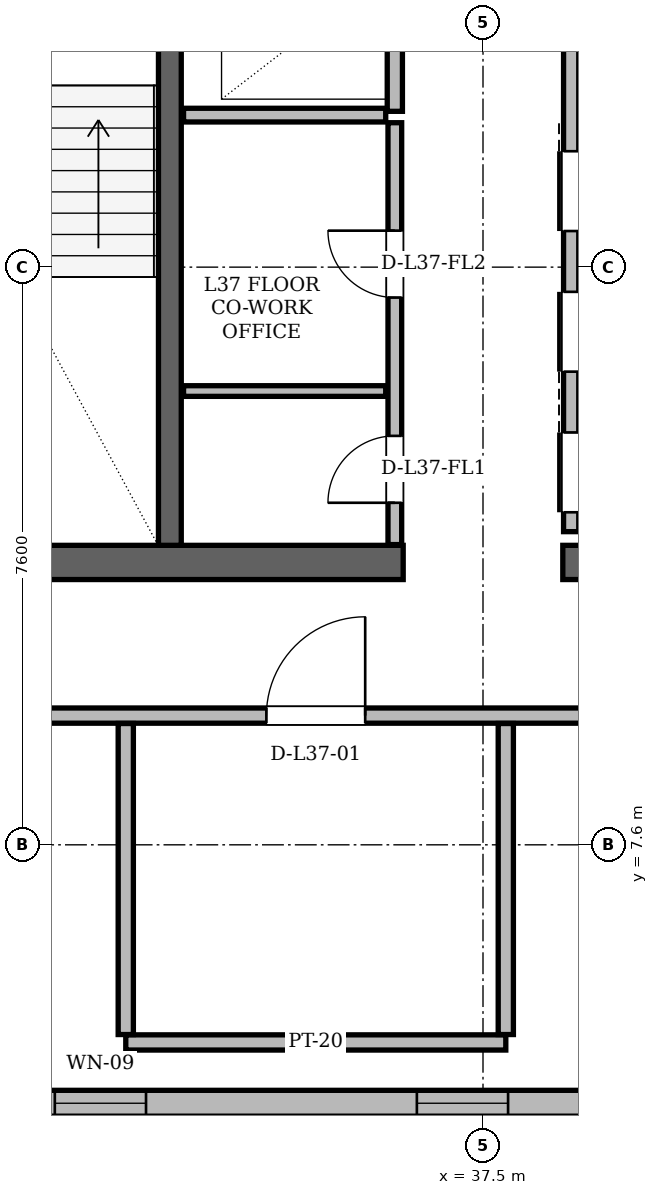
"""IFC4 building model, lengths in metres.
Left out: names, types, materials, properties, quantities, classifications, styles, units other than length and angle.
Written with IfcOpenShell. Run it as: python <this file> out.ifc"""

import sys

from ifc_helpers import new_model, si_unit, direction, frame, frame_2d, origin, place, context, subcontext, project, spatial, rectangle, extrude, element, fill, save


model = new_model("IFC4")
c1 = context("Model", 3, precision=1e-05, world=origin(), true_north=direction((0.0, 1.0)))
c2 = subcontext(c1, "Body", "Model", "MODEL_VIEW")
j1 = project(units=[si_unit("LENGTHUNIT", "METRE"), si_unit("PLANEANGLEUNIT", "RADIAN")], contexts=[c1])
p1 = place(None, origin())
s1 = spatial("IfcSite", under=j1, at=p1, CompositionType="ELEMENT")
p2 = place(p1, origin())
s2 = spatial("IfcBuilding", under=s1, at=p2, CompositionType="ELEMENT")
p3 = place(p2, frame((0.0, 0.0, 142.2)))
s3 = spatial("IfcBuildingStorey", under=s2, at=p3, CompositionType="ELEMENT", Elevation=142.2)
for number, where, z_axis, x_axis in (
    (1, (29.35, 11.315, 0.0), (0.0, 0.0, 1.0), (1.0, 0.0, 0.0)),
    (2, (38.55, 11.315, 0.0), (0.0, 0.0, 1.0), (1.0, 0.0, 0.0)),
):
    element("IfcWall", number, at=place(p3, frame(where, z_axis=z_axis, x_axis=x_axis)), inside=s3, PredefinedType="SHEAR", context=c2, shape_type="SweptSolid", body=[
        extrude(rectangle(XDim=7.1, YDim=0.45, at=frame_2d((3.55, 0.0))), origin(), (0.0, 0.0, 1.0), 3.36),
    ])
p4 = place(p3, frame((33.38, 11.54, 0.0), z_axis=(0.0, 0.0, 1.0), x_axis=(0.0, 1.0, 0.0)))
e3 = element("IfcWall", 3, at=p4, inside=s3, PredefinedType="SHEAR", context=c2, shape_type="SweptSolid", body=[
    extrude(rectangle(XDim=7.62, YDim=0.3, at=frame_2d((3.81, 0.0))), origin(), (0.0, 0.0, 1.0), 3.36),
])
p5 = place(p3, frame((19.833, 4.2, 0.0), z_axis=(0.0, 0.0, 1.0), x_axis=(1.0, 0.0, 0.0)))
e4 = element("IfcWall", 4, at=p5, inside=s3, PredefinedType="SOLIDWALL", context=c2, shape_type="SweptSolid", body=[
    extrude(rectangle(XDim=35.334, YDim=0.34, at=frame_2d((17.667, 0.0))), origin(), (0.0, 0.0, 1.0), 2.58),
])
p6 = place(p5, frame((8.034, 0.0, 0.0)))
e5 = element("IfcOpeningElement", 5, at=p6, cuts=e4, PredefinedType="OPENING", context=c2, shape_type="SweptSolid", body=[
    extrude(rectangle(XDim=1.5, YDim=2.2, at=frame_2d((0.75, 1.1))), frame((0.0, 0.17, 0.0), z_axis=(0.0, -1.0, 0.0), x_axis=(1.0, 0.0, 0.0)), (0.0, 0.0, 1.0), 0.34),
])
p7 = place(p5, frame((27.465, 0.0, 0.0)))
e6 = element("IfcOpeningElement", 6, at=p7, cuts=e4, PredefinedType="OPENING", context=c2, shape_type="SweptSolid", body=[
    extrude(rectangle(XDim=1.5, YDim=2.2, at=frame_2d((0.75, 1.1))), frame((0.0, 0.17, 0.0), z_axis=(0.0, -1.0, 0.0), x_axis=(1.0, 0.0, 0.0)), (0.0, 0.0, 1.0), 0.34),
])
p8 = place(p5, frame((12.033, 0.0, 0.85)))
e7 = element("IfcOpeningElement", 7, at=p8, cuts=e4, PredefinedType="OPENING", context=c2, shape_type="SweptSolid", body=[
    extrude(rectangle(XDim=1.2, YDim=1.48, at=frame_2d((0.6, 0.74))), frame((0.0, 0.17, 0.0), z_axis=(0.0, -1.0, 0.0), x_axis=(1.0, 0.0, 0.0)), (0.0, 0.0, 1.0), 0.34),
])
p9 = place(p5, frame((16.797, 0.0, 0.85)))
e8 = element("IfcOpeningElement", 8, at=p9, cuts=e4, PredefinedType="OPENING", context=c2, shape_type="SweptSolid", body=[
    extrude(rectangle(XDim=1.2, YDim=1.48, at=frame_2d((0.6, 0.74))), frame((0.0, 0.17, 0.0), z_axis=(0.0, -1.0, 0.0), x_axis=(1.0, 0.0, 0.0)), (0.0, 0.0, 1.0), 0.34),
])
p10 = place(p5, frame((31.313, 0.0, 0.85)))
e9 = element("IfcOpeningElement", 9, at=p10, cuts=e4, PredefinedType="OPENING", context=c2, shape_type="SweptSolid", body=[
    extrude(rectangle(XDim=2.6, YDim=1.62, at=frame_2d((1.3, 0.81))), frame((0.0, 0.17, 0.0), z_axis=(0.0, -1.0, 0.0), x_axis=(1.0, 0.0, 0.0)), (0.0, 0.0, 1.0), 0.34),
])
p11 = place(p5, frame((22.491, 0.0, 0.85)))
e10 = element("IfcOpeningElement", 10, at=p11, cuts=e4, PredefinedType="OPENING", context=c2, shape_type="SweptSolid", body=[
    extrude(rectangle(XDim=1.2, YDim=1.48, at=frame_2d((0.6, 0.74))), frame((0.0, 0.17, 0.0), z_axis=(0.0, -1.0, 0.0), x_axis=(1.0, 0.0, 0.0)), (0.0, 0.0, 1.0), 0.34),
])
p12 = place(p3, frame((32.564, 43.35, 0.0), z_axis=(0.0, 0.0, 1.0), x_axis=(-0.500002563111, -0.866023923966, 0.0)))
e11 = element("IfcWall", 11, at=p12, inside=s3, PredefinedType="SOLIDWALL", context=c2, shape_type="SweptSolid", body=[
    extrude(rectangle(XDim=35.334, YDim=0.34, at=frame_2d((17.667, 0.0))), origin(), (0.0, 0.0, 1.0), 2.58),
])
p13 = place(p12, frame((8.034, 0.0, 0.0)))
e12 = element("IfcOpeningElement", 12, at=p13, cuts=e11, PredefinedType="OPENING", context=c2, shape_type="SweptSolid", body=[
    extrude(rectangle(XDim=1.5, YDim=2.2, at=frame_2d((0.75, 1.1))), frame((0.0, 0.17, 0.0), z_axis=(0.0, -1.0, 0.0), x_axis=(1.0, 0.0, 0.0)), (0.0, 0.0, 1.0), 0.34),
])
p14 = place(p12, frame((26.835, 0.0, 0.0)))
e13 = element("IfcOpeningElement", 13, at=p14, cuts=e11, PredefinedType="OPENING", context=c2, shape_type="SweptSolid", body=[
    extrude(rectangle(XDim=1.5, YDim=2.2, at=frame_2d((0.75, 1.1))), frame((0.0, 0.17, 0.0), z_axis=(0.0, -1.0, 0.0), x_axis=(1.0, 0.0, 0.0)), (0.0, 0.0, 1.0), 0.34),
])
p15 = place(p12, frame((22.185, 0.0, 0.85)))
e14 = element("IfcOpeningElement", 14, at=p15, cuts=e11, PredefinedType="OPENING", context=c2, shape_type="SweptSolid", body=[
    extrude(rectangle(XDim=1.2, YDim=1.48, at=frame_2d((0.6, 0.74))), frame((0.0, 0.17, 0.0), z_axis=(0.0, -1.0, 0.0), x_axis=(1.0, 0.0, 0.0)), (0.0, 0.0, 1.0), 0.34),
])
p16 = place(p12, frame((2.318, 0.0, 0.85)))
e15 = element("IfcOpeningElement", 15, at=p16, cuts=e11, PredefinedType="OPENING", context=c2, shape_type="SweptSolid", body=[
    extrude(rectangle(XDim=1.6, YDim=1.62, at=frame_2d((0.8, 0.81))), frame((0.0, 0.17, 0.0), z_axis=(0.0, -1.0, 0.0), x_axis=(1.0, 0.0, 0.0)), (0.0, 0.0, 1.0), 0.34),
])
p17 = place(p12, frame((12.959, 0.0, 0.85)))
e16 = element("IfcOpeningElement", 16, at=p17, cuts=e11, PredefinedType="OPENING", context=c2, shape_type="SweptSolid", body=[
    extrude(rectangle(XDim=3.0, YDim=1.62, at=frame_2d((1.5, 0.81))), frame((0.0, 0.17, 0.0), z_axis=(0.0, -1.0, 0.0), x_axis=(1.0, 0.0, 0.0)), (0.0, 0.0, 1.0), 0.34),
])
p18 = place(p12, frame((20.293, 0.0, 0.85)))
e17 = element("IfcOpeningElement", 17, at=p18, cuts=e11, PredefinedType="OPENING", context=c2, shape_type="SweptSolid", body=[
    extrude(rectangle(XDim=1.2, YDim=1.48, at=frame_2d((0.6, 0.74))), frame((0.0, 0.17, 0.0), z_axis=(0.0, -1.0, 0.0), x_axis=(1.0, 0.0, 0.0)), (0.0, 0.0, 1.0), 0.34),
])
p19 = place(p12, frame((33.535, 0.0, 0.85)))
e18 = element("IfcOpeningElement", 18, at=p19, cuts=e11, PredefinedType="OPENING", context=c2, shape_type="SweptSolid", body=[
    extrude(rectangle(XDim=1.2, YDim=1.48, at=frame_2d((0.6, 0.74))), frame((0.0, 0.17, 0.0), z_axis=(0.0, -1.0, 0.0), x_axis=(1.0, 0.0, 0.0)), (0.0, 0.0, 1.0), 0.34),
])
p20 = place(p3, frame((36.34, 17.25, 0.0), z_axis=(0.0, 0.0, 1.0), x_axis=(0.0, 1.0, 0.0)))
e19 = element("IfcWall", 19, at=p20, inside=s3, PredefinedType="PARTITIONING", context=c2, shape_type="SweptSolid", body=[
    extrude(rectangle(XDim=2.07, YDim=0.2, at=frame_2d((1.035, 0.0))), origin(), (0.0, 0.0, 1.0), 3.36),
])
p21 = place(p3, frame((33.56, 17.2, 0.0), z_axis=(0.0, 0.0, 1.0), x_axis=(1.0, 0.0, 0.0)))
e20 = element("IfcWall", 20, at=p21, inside=s3, PredefinedType="PARTITIONING", context=c2, shape_type="SweptSolid", body=[
    extrude(rectangle(XDim=2.66, YDim=0.18, at=frame_2d((1.33, 0.0))), origin(), (0.0, 0.0, 1.0), 3.36),
])
p22 = place(p3, frame((36.34, 11.55, 0.0), z_axis=(0.0, 0.0, 1.0), x_axis=(0.0, 1.0, 0.0)))
e21 = element("IfcWall", 21, at=p22, inside=s3, PredefinedType="PARTITIONING", context=c2, shape_type="SweptSolid", body=[
    extrude(rectangle(XDim=5.55, YDim=0.18, at=frame_2d((2.775, 0.0))), origin(), (0.0, 0.0, 1.0), 3.36),
])
p23 = place(p22, frame((0.55, 0.0, 0.0)))
e22 = element("IfcOpeningElement", 22, at=p23, cuts=e21, PredefinedType="OPENING", context=c2, shape_type="SweptSolid", body=[
    extrude(rectangle(XDim=0.88, YDim=2.08, at=frame_2d((0.44, 1.04))), frame((0.0, 0.09, 0.0), z_axis=(0.0, -1.0, 0.0), x_axis=(1.0, 0.0, 0.0)), (0.0, 0.0, 1.0), 0.18),
])
p24 = place(p22, frame((3.25, 0.0, 0.0)))
e23 = element("IfcOpeningElement", 23, at=p24, cuts=e21, PredefinedType="OPENING", context=c2, shape_type="SweptSolid", body=[
    extrude(rectangle(XDim=0.88, YDim=2.08, at=frame_2d((0.44, 1.04))), frame((0.0, 0.09, 0.0), z_axis=(0.0, -1.0, 0.0), x_axis=(1.0, 0.0, 0.0)), (0.0, 0.0, 1.0), 0.18),
])
p25 = place(p3, frame((33.56, 13.57, 0.0), z_axis=(0.0, 0.0, 1.0), x_axis=(1.0, 0.0, 0.0)))
e24 = element("IfcWall", 24, at=p25, inside=s3, PredefinedType="PARTITIONING", context=c2, shape_type="SweptSolid", body=[
    extrude(rectangle(XDim=2.66, YDim=0.14, at=frame_2d((1.33, 0.0))), origin(), (0.0, 0.0, 1.0), 3.36),
])
p26 = place(p3, frame((38.66, 11.72, 0.0), z_axis=(0.0, 0.0, 1.0), x_axis=(0.0, 1.0, 0.0)))
e25 = element("IfcWall", 25, at=p26, inside=s3, PredefinedType="PARTITIONING", context=c2, shape_type="SweptSolid", body=[
    extrude(rectangle(XDim=9.1, YDim=0.2, at=frame_2d((4.55, 0.0))), origin(), (0.0, 0.0, 1.0), 3.36),
])
p27 = place(p26, frame((0.255, 0.0, 0.0)))
e26 = element("IfcOpeningElement", 26, at=p27, cuts=e25, PredefinedType="OPENING", context=c2, shape_type="SweptSolid", body=[
    extrude(rectangle(XDim=1.05, YDim=2.15, at=frame_2d((0.525, 1.075))), frame((0.0, 0.1, 0.0), z_axis=(0.0, -1.0, 0.0), x_axis=(1.0, 0.0, 0.0)), (0.0, 0.0, 1.0), 0.2),
])
p28 = place(p26, frame((2.105, 0.0, 0.0)))
e27 = element("IfcOpeningElement", 27, at=p28, cuts=e25, PredefinedType="OPENING", context=c2, shape_type="SweptSolid", body=[
    extrude(rectangle(XDim=1.05, YDim=2.15, at=frame_2d((0.525, 1.075))), frame((0.0, 0.1, 0.0), z_axis=(0.0, -1.0, 0.0), x_axis=(1.0, 0.0, 0.0)), (0.0, 0.0, 1.0), 0.2),
])
p29 = place(p26, frame((3.955, 0.0, 0.0)))
e28 = element("IfcOpeningElement", 28, at=p29, cuts=e25, PredefinedType="OPENING", context=c2, shape_type="SweptSolid", body=[
    extrude(rectangle(XDim=1.05, YDim=2.15, at=frame_2d((0.525, 1.075))), frame((0.0, 0.1, 0.0), z_axis=(0.0, -1.0, 0.0), x_axis=(1.0, 0.0, 0.0)), (0.0, 0.0, 1.0), 0.2),
])
p30 = place(p3, frame((32.8, 5.0, 0.0), z_axis=(0.0, 0.0, 1.0), x_axis=(1.0, 0.0, 0.0)))
e29 = element("IfcWall", 29, at=p30, inside=s3, PredefinedType="PARTITIONING", context=c2, shape_type="SweptSolid", body=[
    extrude(rectangle(XDim=5.0, YDim=0.2, at=frame_2d((2.5, 0.0))), origin(), (0.0, 0.0, 1.0), 3.36),
])
p31 = place(p3, frame((19.6, 9.3, 0.0), z_axis=(0.0, 0.0, 1.0), x_axis=(1.0, 0.0, 0.0)))
e30 = element("IfcWall", 30, at=p31, inside=s3, PredefinedType="PARTITIONING", context=c2, shape_type="SweptSolid", body=[
    extrude(rectangle(XDim=30.4, YDim=0.2, at=frame_2d((15.2, 0.0))), origin(), (0.0, 0.0, 1.0), 2.822),
])
p32 = place(p31, frame((15.05, 0.0, 0.0)))
e31 = element("IfcOpeningElement", 31, at=p32, cuts=e30, PredefinedType="OPENING", context=c2, shape_type="SweptSolid", body=[
    extrude(rectangle(XDim=1.3, YDim=2.2, at=frame_2d((0.65, 1.1))), frame((0.0, 0.1, 0.0), z_axis=(0.0, -1.0, 0.0), x_axis=(1.0, 0.0, 0.0)), (0.0, 0.0, 1.0), 0.2),
])
p33 = place(p31, frame((28.534, 0.0, 0.0)))
e32 = element("IfcOpeningElement", 32, at=p33, cuts=e30, PredefinedType="OPENING", context=c2, shape_type="SweptSolid", body=[
    extrude(rectangle(XDim=1.0, YDim=2.18, at=frame_2d((0.5, 1.09))), frame((0.0, 0.1, 0.0), z_axis=(0.0, -1.0, 0.0), x_axis=(1.0, 0.0, 0.0)), (0.0, 0.0, 1.0), 0.2),
])
p34 = place(p3, frame((32.8, 5.104, 0.0), z_axis=(0.0, 0.0, 1.0), x_axis=(0.0, 1.0, 0.0)))
e33 = element("IfcWall", 33, at=p34, inside=s3, PredefinedType="PARTITIONING", context=c2, shape_type="SweptSolid", body=[
    extrude(rectangle(XDim=4.092, YDim=0.2, at=frame_2d((2.046, 0.0))), origin(), (0.0, 0.0, 1.0), 2.946),
])
p35 = place(p3, frame((37.8, 5.104, 0.0), z_axis=(0.0, 0.0, 1.0), x_axis=(0.0, 1.0, 0.0)))
e34 = element("IfcWall", 34, at=p35, inside=s3, PredefinedType="PARTITIONING", context=c2, shape_type="SweptSolid", body=[
    extrude(rectangle(XDim=4.092, YDim=0.2, at=frame_2d((2.046, 0.0))), origin(), (0.0, 0.0, 1.0), 3.36),
])
p36 = place(p8, origin())
e35 = element("IfcWindow", 35, at=p36, inside=s3, PartitioningType="SINGLE_PANEL", PredefinedType="WINDOW", context=c2, shape_type="SweptSolid", body=[
    extrude(rectangle(XDim=1.2, YDim=1.48, at=frame_2d((0.6, 0.74))), frame((0.0, 0.03, 0.0), z_axis=(0.0, -1.0, 0.0), x_axis=(1.0, 0.0, 0.0)), (0.0, 0.0, 1.0), 0.06),
])
fill(e7, e35)
p37 = place(p9, origin())
e36 = element("IfcWindow", 36, at=p37, inside=s3, PartitioningType="SINGLE_PANEL", PredefinedType="WINDOW", context=c2, shape_type="SweptSolid", body=[
    extrude(rectangle(XDim=1.2, YDim=1.48, at=frame_2d((0.6, 0.74))), frame((0.0, 0.03, 0.0), z_axis=(0.0, -1.0, 0.0), x_axis=(1.0, 0.0, 0.0)), (0.0, 0.0, 1.0), 0.06),
])
fill(e8, e36)
p38 = place(p23, origin())
e37 = element("IfcDoor", 37, at=p38, inside=s3, OperationType="SINGLE_SWING_LEFT", PredefinedType="DOOR", context=c2, shape_type="SweptSolid", body=[
    extrude(rectangle(XDim=0.88, YDim=2.08, at=frame_2d((0.44, 1.04))), frame((0.0, 0.025, 0.0), z_axis=(0.0, -1.0, 0.0), x_axis=(1.0, 0.0, 0.0)), (0.0, 0.0, 1.0), 0.05),
])
fill(e22, e37)
p39 = place(p24, origin())
e38 = element("IfcDoor", 38, at=p39, inside=s3, OperationType="SINGLE_SWING_RIGHT", PredefinedType="DOOR", context=c2, shape_type="SweptSolid", body=[
    extrude(rectangle(XDim=0.88, YDim=2.08, at=frame_2d((0.44, 1.04))), frame((0.0, 0.025, 0.0), z_axis=(0.0, -1.0, 0.0), x_axis=(1.0, 0.0, 0.0)), (0.0, 0.0, 1.0), 0.05),
])
fill(e23, e38)
p40 = place(p27, origin())
e39 = element("IfcDoor", 39, at=p40, inside=s3, OperationType="SLIDING_TO_RIGHT", PredefinedType="DOOR", context=c2, shape_type="SweptSolid", body=[
    extrude(rectangle(XDim=1.05, YDim=2.15, at=frame_2d((0.525, 1.075))), frame((0.0, 0.025, 0.0), z_axis=(0.0, -1.0, 0.0), x_axis=(1.0, 0.0, 0.0)), (0.0, 0.0, 1.0), 0.05),
])
fill(e26, e39)
p41 = place(p28, origin())
e40 = element("IfcDoor", 40, at=p41, inside=s3, OperationType="SLIDING_TO_LEFT", PredefinedType="DOOR", context=c2, shape_type="SweptSolid", body=[
    extrude(rectangle(XDim=1.05, YDim=2.15, at=frame_2d((0.525, 1.075))), frame((0.0, 0.025, 0.0), z_axis=(0.0, -1.0, 0.0), x_axis=(1.0, 0.0, 0.0)), (0.0, 0.0, 1.0), 0.05),
])
fill(e27, e40)
p42 = place(p29, origin())
e41 = element("IfcDoor", 41, at=p42, inside=s3, OperationType="SLIDING_TO_RIGHT", PredefinedType="DOOR", context=c2, shape_type="SweptSolid", body=[
    extrude(rectangle(XDim=1.05, YDim=2.15, at=frame_2d((0.525, 1.075))), frame((0.0, 0.025, 0.0), z_axis=(0.0, -1.0, 0.0), x_axis=(1.0, 0.0, 0.0)), (0.0, 0.0, 1.0), 0.05),
])
fill(e28, e41)
p43 = place(p32, origin())
e42 = element("IfcDoor", 42, at=p43, inside=s3, OperationType="SINGLE_SWING_RIGHT", PredefinedType="DOOR", context=c2, shape_type="SweptSolid", body=[
    extrude(rectangle(XDim=1.3, YDim=2.2, at=frame_2d((0.65, 1.1))), frame((0.0, 0.025, 0.0), z_axis=(0.0, -1.0, 0.0), x_axis=(1.0, 0.0, 0.0)), (0.0, 0.0, 1.0), 0.05),
])
fill(e31, e42)
save(model, sys.argv[1])
